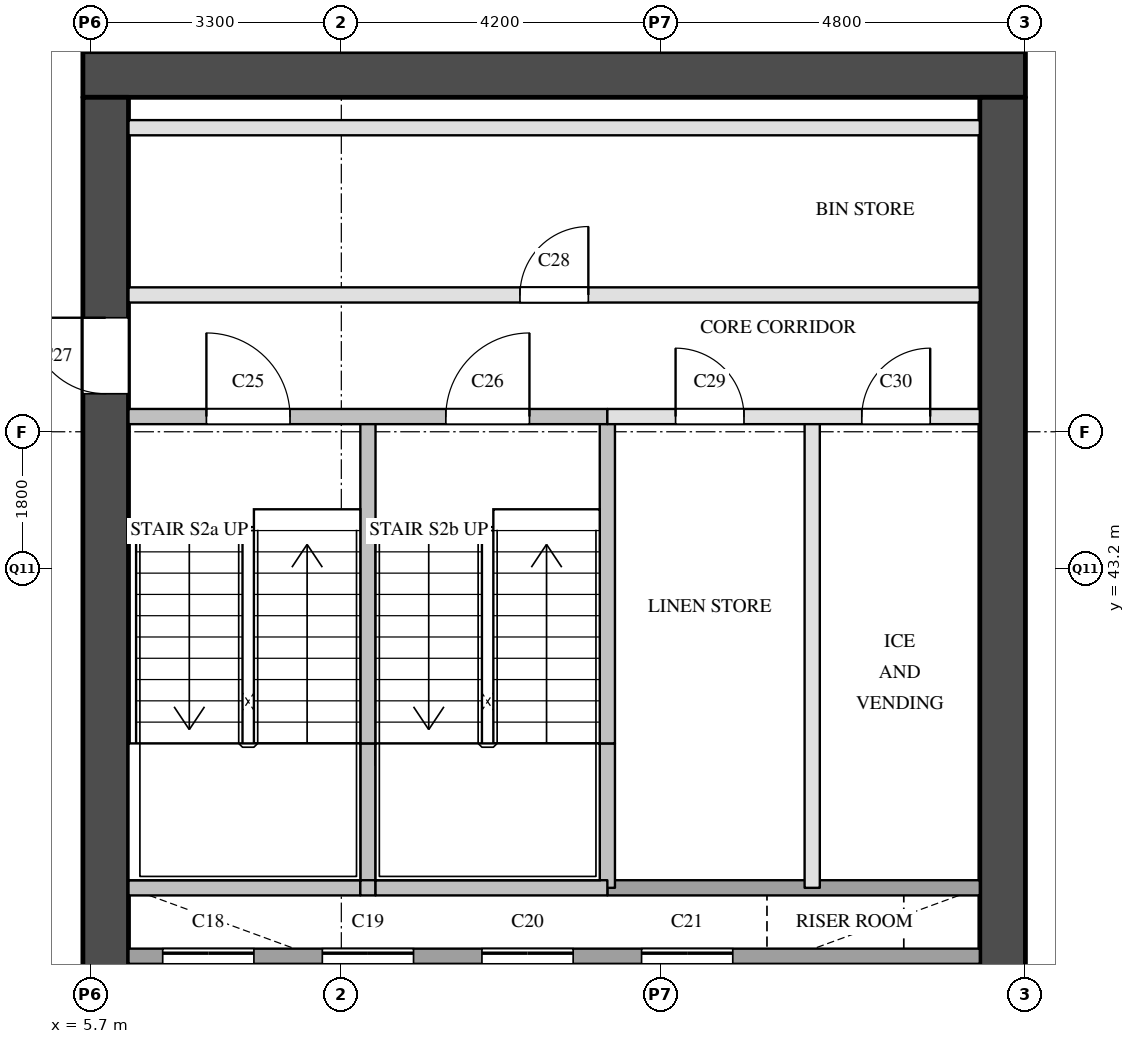
"""IFC4 building model, lengths in metres.
Left out: names, types, materials, properties, quantities, classifications, styles, units other than length and angle.
Written with IfcOpenShell. Run it as: python <this file> out.ifc"""

import sys

from ifc_helpers import new_model, si_unit, direction, frame, frame_2d, origin, place, context, subcontext, project, spatial, rectangle, extrude, element, fill, save


model = new_model("IFC4")
c1 = context("Model", 3, precision=1e-05, world=origin(), true_north=direction((0.0, 1.0)))
c2 = subcontext(c1, "Body", "Model", "MODEL_VIEW")
j1 = project(units=[si_unit("LENGTHUNIT", "METRE"), si_unit("PLANEANGLEUNIT", "RADIAN")], contexts=[c1])
p1 = place(None, origin())
s1 = spatial("IfcSite", under=j1, at=p1, CompositionType="ELEMENT")
p2 = place(p1, origin())
s2 = spatial("IfcBuilding", under=s1, at=p2, CompositionType="ELEMENT")
p3 = place(p2, frame((0.0, 0.0, 61.4)))
s3 = spatial("IfcBuildingStorey", under=s2, at=p3, CompositionType="ELEMENT", Elevation=61.4)
p4 = place(p3, frame((5.6, 49.7, 0.0), z_axis=(0.0, 0.0, 1.0), x_axis=(1.0, 0.0, 0.0)))
e1 = element("IfcWall", 1, at=p4, inside=s3, PredefinedType="SHEAR", context=c2, shape_type="SweptSolid", body=[
    extrude(rectangle(XDim=12.4, YDim=0.6, at=frame_2d((6.2, 0.0))), origin(), (0.0, 0.0, 1.0), 3.5),
])
p5 = place(p3, frame((5.9, 29.1, 0.0), z_axis=(0.0, 0.0, 1.0), x_axis=(0.0, 1.0, 0.0)))
e2 = element("IfcWall", 2, at=p5, inside=s3, PredefinedType="SHEAR", context=c2, shape_type="SweptSolid", body=[
    extrude(rectangle(XDim=20.3, YDim=0.6, at=frame_2d((10.15, 0.0))), origin(), (0.0, 0.0, 1.0), 3.5),
])
p6 = place(p5, frame((3.6, 0.0, 0.0)))
e3 = element("IfcOpeningElement", 3, at=p6, cuts=e2, PredefinedType="OPENING", context=c2, shape_type="SweptSolid", body=[
    extrude(rectangle(XDim=1.8, YDim=2.1, at=frame_2d((0.9, 1.05))), frame((0.0, 0.31, 0.0), z_axis=(0.0, -1.0, 0.0), x_axis=(1.0, 0.0, 0.0)), (0.0, 0.0, 1.0), 0.62),
])
p7 = place(p5, frame((16.4, 0.0, 0.0)))
e4 = element("IfcOpeningElement", 4, at=p7, cuts=e2, PredefinedType="OPENING", context=c2, shape_type="SweptSolid", body=[
    extrude(rectangle(XDim=1.0, YDim=2.1, at=frame_2d((0.5, 1.05))), frame((0.0, 0.31, 0.0), z_axis=(0.0, -1.0, 0.0), x_axis=(1.0, 0.0, 0.0)), (0.0, 0.0, 1.0), 0.62),
])
p8 = place(p3, frame((17.7, 29.1, 0.0), z_axis=(0.0, 0.0, 1.0), x_axis=(0.0, 1.0, 0.0)))
e5 = element("IfcWall", 5, at=p8, inside=s3, PredefinedType="SHEAR", context=c2, shape_type="SweptSolid", body=[
    extrude(rectangle(XDim=20.3, YDim=0.6, at=frame_2d((10.15, 0.0))), origin(), (0.0, 0.0, 1.0), 3.5),
])
p9 = place(p8, frame((1.25, 0.0, 0.0)))
e6 = element("IfcOpeningElement", 6, at=p9, cuts=e5, PredefinedType="OPENING", context=c2, shape_type="SweptSolid", body=[
    extrude(rectangle(XDim=0.7, YDim=2.1, at=frame_2d((0.35, 1.05))), frame((0.0, 0.31, 0.0), z_axis=(0.0, -1.0, 0.0), x_axis=(1.0, 0.0, 0.0)), (0.0, 0.0, 1.0), 0.62),
])
p10 = place(p8, frame((7.05, 0.0, 0.0)))
e7 = element("IfcOpeningElement", 7, at=p10, cuts=e5, PredefinedType="OPENING", context=c2, shape_type="SweptSolid", body=[
    extrude(rectangle(XDim=0.7, YDim=2.1, at=frame_2d((0.35, 1.05))), frame((0.0, 0.31, 0.0), z_axis=(0.0, -1.0, 0.0), x_axis=(1.0, 0.0, 0.0)), (0.0, 0.0, 1.0), 0.62),
])
p11 = place(p3, frame((8.3, 34.9, 0.0), z_axis=(0.0, 0.0, 1.0), x_axis=(0.0, 1.0, 0.0)))
e8 = element("IfcWall", 8, at=p11, inside=s3, PredefinedType="SOLIDWALL", context=c2, shape_type="SweptSolid", body=[
    extrude(rectangle(XDim=3.2, YDim=0.2, at=frame_2d((1.6, 0.0))), origin(), (0.0, 0.0, 1.0), 3.5),
])
p12 = place(p3, frame((9.35, 39.0, 0.0), z_axis=(0.0, 0.0, 1.0), x_axis=(0.0, 1.0, 0.0)))
e9 = element("IfcWall", 9, at=p12, inside=s3, PredefinedType="SOLIDWALL", context=c2, shape_type="SweptSolid", body=[
    extrude(rectangle(XDim=1.9, YDim=0.2, at=frame_2d((0.95, 0.0))), origin(), (0.0, 0.0, 1.0), 3.5),
])
p13 = place(p3, frame((9.35, 40.9, 0.0), z_axis=(0.0, 0.0, 1.0), x_axis=(0.0, 1.0, 0.0)))
e10 = element("IfcWall", 10, at=p13, inside=s3, PredefinedType="SOLIDWALL", context=c2, shape_type="SweptSolid", body=[
    extrude(rectangle(XDim=4.3, YDim=0.2, at=frame_2d((2.15, 0.0))), origin(), (0.0, 0.0, 1.0), 3.5),
])
for number, where, z_axis, x_axis in (
    (11, (10.4, 34.9, 0.0), (0.0, 0.0, 1.0), (0.0, 1.0, 0.0)),
    (12, (12.5, 34.9, 0.0), (0.0, 0.0, 1.0), (0.0, 1.0, 0.0)),
):
    element("IfcWall", number, at=place(p3, frame(where, z_axis=z_axis, x_axis=x_axis)), inside=s3, PredefinedType="SOLIDWALL", context=c2, shape_type="SweptSolid", body=[
        extrude(rectangle(XDim=3.2, YDim=0.2, at=frame_2d((1.6, 0.0))), origin(), (0.0, 0.0, 1.0), 3.5),
    ])
p14 = place(p3, frame((12.5, 39.0, 0.0), z_axis=(0.0, 0.0, 1.0), x_axis=(0.0, 1.0, 0.0)))
e13 = element("IfcWall", 13, at=p14, inside=s3, PredefinedType="SOLIDWALL", context=c2, shape_type="SweptSolid", body=[
    extrude(rectangle(XDim=1.9, YDim=0.2, at=frame_2d((0.95, 0.0))), origin(), (0.0, 0.0, 1.0), 3.5),
])
p15 = place(p3, frame((12.5, 40.9, 0.0), z_axis=(0.0, 0.0, 1.0), x_axis=(0.0, 1.0, 0.0)))
e14 = element("IfcWall", 14, at=p15, inside=s3, PredefinedType="SOLIDWALL", context=c2, shape_type="SweptSolid", body=[
    extrude(rectangle(XDim=4.3, YDim=0.2, at=frame_2d((2.15, 0.0))), origin(), (0.0, 0.0, 1.0), 3.5),
])
p16 = place(p3, frame((14.6, 34.9, 0.0), z_axis=(0.0, 0.0, 1.0), x_axis=(0.0, 1.0, 0.0)))
e15 = element("IfcWall", 15, at=p16, inside=s3, PredefinedType="SOLIDWALL", context=c2, shape_type="SweptSolid", body=[
    extrude(rectangle(XDim=3.2, YDim=0.2, at=frame_2d((1.6, 0.0))), origin(), (0.0, 0.0, 1.0), 3.5),
])
p17 = place(p3, frame((15.195, 39.0, 0.0), z_axis=(0.0, 0.0, 1.0), x_axis=(0.0, 1.0, 0.0)))
e16 = element("IfcWall", 16, at=p17, inside=s3, PredefinedType="PARTITIONING", context=c2, shape_type="SweptSolid", body=[
    extrude(rectangle(XDim=6.2, YDim=0.2, at=frame_2d((3.1, 0.0))), origin(), (0.0, 0.0, 1.0), 3.5),
])
p18 = place(p3, frame((16.7, 34.9, 0.0), z_axis=(0.0, 0.0, 1.0), x_axis=(0.0, 1.0, 0.0)))
e17 = element("IfcWall", 17, at=p18, inside=s3, PredefinedType="SOLIDWALL", context=c2, shape_type="SweptSolid", body=[
    extrude(rectangle(XDim=3.2, YDim=0.2, at=frame_2d((1.6, 0.0))), origin(), (0.0, 0.0, 1.0), 3.5),
])
p19 = place(p3, frame((6.2, 38.1, 0.0), z_axis=(0.0, 0.0, 1.0), x_axis=(1.0, 0.0, 0.0)))
e18 = element("IfcWall", 18, at=p19, inside=s3, PredefinedType="SOLIDWALL", context=c2, shape_type="SweptSolid", body=[
    extrude(rectangle(XDim=11.2, YDim=0.2, at=frame_2d((5.6, 0.0))), origin(), (0.0, 0.0, 1.0), 3.5),
])
p20 = place(p19, frame((0.45, 0.0, 0.0)))
e19 = element("IfcOpeningElement", 19, at=p20, cuts=e18, PredefinedType="OPENING", context=c2, shape_type="SweptSolid", body=[
    extrude(rectangle(XDim=1.2, YDim=2.1, at=frame_2d((0.6, 1.05))), frame((0.0, 0.11, 0.0), z_axis=(0.0, -1.0, 0.0), x_axis=(1.0, 0.0, 0.0)), (0.0, 0.0, 1.0), 0.22),
])
p21 = place(p19, frame((2.55, 0.0, 0.0)))
e20 = element("IfcOpeningElement", 20, at=p21, cuts=e18, PredefinedType="OPENING", context=c2, shape_type="SweptSolid", body=[
    extrude(rectangle(XDim=1.2, YDim=2.1, at=frame_2d((0.6, 1.05))), frame((0.0, 0.11, 0.0), z_axis=(0.0, -1.0, 0.0), x_axis=(1.0, 0.0, 0.0)), (0.0, 0.0, 1.0), 0.22),
])
p22 = place(p19, frame((4.65, 0.0, 0.0)))
e21 = element("IfcOpeningElement", 21, at=p22, cuts=e18, PredefinedType="OPENING", context=c2, shape_type="SweptSolid", body=[
    extrude(rectangle(XDim=1.2, YDim=2.1, at=frame_2d((0.6, 1.05))), frame((0.0, 0.11, 0.0), z_axis=(0.0, -1.0, 0.0), x_axis=(1.0, 0.0, 0.0)), (0.0, 0.0, 1.0), 0.22),
])
p23 = place(p19, frame((6.75, 0.0, 0.0)))
e22 = element("IfcOpeningElement", 22, at=p23, cuts=e18, PredefinedType="OPENING", context=c2, shape_type="SweptSolid", body=[
    extrude(rectangle(XDim=1.2, YDim=2.1, at=frame_2d((0.6, 1.05))), frame((0.0, 0.11, 0.0), z_axis=(0.0, -1.0, 0.0), x_axis=(1.0, 0.0, 0.0)), (0.0, 0.0, 1.0), 0.22),
])
p24 = place(p3, frame((12.5, 39.0, 0.0), z_axis=(0.0, 0.0, 1.0), x_axis=(1.0, 0.0, 0.0)))
e23 = element("IfcWall", 23, at=p24, inside=s3, PredefinedType="SOLIDWALL", context=c2, shape_type="SweptSolid", body=[
    extrude(rectangle(XDim=4.9, YDim=0.2, at=frame_2d((2.45, 0.0))), origin(), (0.0, 0.0, 1.0), 3.5),
])
p25 = place(p3, frame((6.2, 39.0, 0.0), z_axis=(0.0, 0.0, 1.0), x_axis=(1.0, 0.0, 0.0)))
e24 = element("IfcWall", 24, at=p25, inside=s3, PredefinedType="SOLIDWALL", context=c2, shape_type="SweptSolid", body=[
    extrude(rectangle(XDim=3.05, YDim=0.2, at=frame_2d((1.525, 0.0))), origin(), (0.0, 0.0, 1.0), 3.5),
])
p26 = place(p3, frame((9.25, 39.0, 0.0), z_axis=(0.0, 0.0, 1.0), x_axis=(1.0, 0.0, 0.0)))
e25 = element("IfcWall", 25, at=p26, inside=s3, PredefinedType="SOLIDWALL", context=c2, shape_type="SweptSolid", body=[
    extrude(rectangle(XDim=0.2, YDim=0.2, at=frame_2d((0.1, 0.0))), origin(), (0.0, 0.0, 1.0), 3.5),
])
p27 = place(p3, frame((9.45, 39.0, 0.0), z_axis=(0.0, 0.0, 1.0), x_axis=(1.0, 0.0, 0.0)))
e26 = element("IfcWall", 26, at=p27, inside=s3, PredefinedType="SOLIDWALL", context=c2, shape_type="SweptSolid", body=[
    extrude(rectangle(XDim=3.05, YDim=0.2, at=frame_2d((1.525, 0.0))), origin(), (0.0, 0.0, 1.0), 3.5),
])
p28 = place(p3, frame((12.5, 45.2, 0.0), z_axis=(0.0, 0.0, 1.0), x_axis=(1.0, 0.0, 0.0)))
e27 = element("IfcWall", 27, at=p28, inside=s3, PredefinedType="PARTITIONING", context=c2, shape_type="SweptSolid", body=[
    extrude(rectangle(XDim=4.9, YDim=0.2, at=frame_2d((2.45, 0.0))), origin(), (0.0, 0.0, 1.0), 3.5),
])
p29 = place(p28, frame((0.897, 0.0, 0.0)))
e28 = element("IfcOpeningElement", 28, at=p29, cuts=e27, PredefinedType="OPENING", context=c2, shape_type="SweptSolid", body=[
    extrude(rectangle(XDim=0.9, YDim=2.1, at=frame_2d((0.45, 1.05))), frame((0.0, 0.11, 0.0), z_axis=(0.0, -1.0, 0.0), x_axis=(1.0, 0.0, 0.0)), (0.0, 0.0, 1.0), 0.22),
])
p30 = place(p28, frame((3.347, 0.0, 0.0)))
e29 = element("IfcOpeningElement", 29, at=p30, cuts=e27, PredefinedType="OPENING", context=c2, shape_type="SweptSolid", body=[
    extrude(rectangle(XDim=0.9, YDim=2.1, at=frame_2d((0.45, 1.05))), frame((0.0, 0.11, 0.0), z_axis=(0.0, -1.0, 0.0), x_axis=(1.0, 0.0, 0.0)), (0.0, 0.0, 1.0), 0.22),
])
p31 = place(p3, frame((6.2, 45.2, 0.0), z_axis=(0.0, 0.0, 1.0), x_axis=(1.0, 0.0, 0.0)))
e30 = element("IfcWall", 30, at=p31, inside=s3, PredefinedType="SOLIDWALL", context=c2, shape_type="SweptSolid", body=[
    extrude(rectangle(XDim=6.3, YDim=0.2, at=frame_2d((3.15, 0.0))), origin(), (0.0, 0.0, 1.0), 3.5),
])
p32 = place(p31, frame((1.025, 0.0, 0.0)))
e31 = element("IfcOpeningElement", 31, at=p32, cuts=e30, PredefinedType="OPENING", context=c2, shape_type="SweptSolid", body=[
    extrude(rectangle(XDim=1.1, YDim=2.1, at=frame_2d((0.55, 1.05))), frame((0.0, 0.11, 0.0), z_axis=(0.0, -1.0, 0.0), x_axis=(1.0, 0.0, 0.0)), (0.0, 0.0, 1.0), 0.22),
])
p33 = place(p31, frame((4.175, 0.0, 0.0)))
e32 = element("IfcOpeningElement", 32, at=p33, cuts=e30, PredefinedType="OPENING", context=c2, shape_type="SweptSolid", body=[
    extrude(rectangle(XDim=1.1, YDim=2.1, at=frame_2d((0.55, 1.05))), frame((0.0, 0.11, 0.0), z_axis=(0.0, -1.0, 0.0), x_axis=(1.0, 0.0, 0.0)), (0.0, 0.0, 1.0), 0.22),
])
p34 = place(p3, frame((6.2, 46.8, 0.0), z_axis=(0.0, 0.0, 1.0), x_axis=(1.0, 0.0, 0.0)))
e33 = element("IfcWall", 33, at=p34, inside=s3, PredefinedType="PARTITIONING", context=c2, shape_type="SweptSolid", body=[
    extrude(rectangle(XDim=11.2, YDim=0.2, at=frame_2d((5.6, 0.0))), origin(), (0.0, 0.0, 1.0), 3.5),
])
p35 = place(p34, frame((5.15, 0.0, 0.0)))
e34 = element("IfcOpeningElement", 34, at=p35, cuts=e33, PredefinedType="OPENING", context=c2, shape_type="SweptSolid", body=[
    extrude(rectangle(XDim=0.9, YDim=2.1, at=frame_2d((0.45, 1.05))), frame((0.0, 0.11, 0.0), z_axis=(0.0, -1.0, 0.0), x_axis=(1.0, 0.0, 0.0)), (0.0, 0.0, 1.0), 0.22),
])
p36 = place(p3, frame((6.2, 49.0, 0.0), z_axis=(0.0, 0.0, 1.0), x_axis=(1.0, 0.0, 0.0)))
e35 = element("IfcWall", 35, at=p36, inside=s3, PredefinedType="PARTITIONING", context=c2, shape_type="SweptSolid", body=[
    extrude(rectangle(XDim=11.2, YDim=0.2, at=frame_2d((5.6, 0.0))), origin(), (0.0, 0.0, 1.0), 3.5),
])
p37 = place(p20, origin())
e36 = element("IfcDoor", 36, at=p37, inside=s3, OperationType="SLIDING_TO_LEFT", PredefinedType="DOOR", context=c2, shape_type="SweptSolid", body=[
    extrude(rectangle(XDim=1.2, YDim=2.1, at=frame_2d((0.6, 1.05))), frame((0.0, 0.025, 0.0), z_axis=(0.0, -1.0, 0.0), x_axis=(1.0, 0.0, 0.0)), (0.0, 0.0, 1.0), 0.05),
])
fill(e19, e36)
p38 = place(p21, origin())
e37 = element("IfcDoor", 37, at=p38, inside=s3, OperationType="SLIDING_TO_LEFT", PredefinedType="DOOR", context=c2, shape_type="SweptSolid", body=[
    extrude(rectangle(XDim=1.2, YDim=2.1, at=frame_2d((0.6, 1.05))), frame((0.0, 0.025, 0.0), z_axis=(0.0, -1.0, 0.0), x_axis=(1.0, 0.0, 0.0)), (0.0, 0.0, 1.0), 0.05),
])
fill(e20, e37)
p39 = place(p22, origin())
e38 = element("IfcDoor", 38, at=p39, inside=s3, OperationType="SLIDING_TO_LEFT", PredefinedType="DOOR", context=c2, shape_type="SweptSolid", body=[
    extrude(rectangle(XDim=1.2, YDim=2.1, at=frame_2d((0.6, 1.05))), frame((0.0, 0.025, 0.0), z_axis=(0.0, -1.0, 0.0), x_axis=(1.0, 0.0, 0.0)), (0.0, 0.0, 1.0), 0.05),
])
fill(e21, e38)
p40 = place(p23, origin())
e39 = element("IfcDoor", 39, at=p40, inside=s3, OperationType="SLIDING_TO_LEFT", PredefinedType="DOOR", context=c2, shape_type="SweptSolid", body=[
    extrude(rectangle(XDim=1.2, YDim=2.1, at=frame_2d((0.6, 1.05))), frame((0.0, 0.025, 0.0), z_axis=(0.0, -1.0, 0.0), x_axis=(1.0, 0.0, 0.0)), (0.0, 0.0, 1.0), 0.05),
])
fill(e22, e39)
p41 = place(p32, origin())
e40 = element("IfcDoor", 40, at=p41, inside=s3, OperationType="SINGLE_SWING_LEFT", PredefinedType="DOOR", context=c2, shape_type="SweptSolid", body=[
    extrude(rectangle(XDim=1.1, YDim=2.1, at=frame_2d((0.55, 1.05))), frame((0.0, 0.025, 0.0), z_axis=(0.0, -1.0, 0.0), x_axis=(1.0, 0.0, 0.0)), (0.0, 0.0, 1.0), 0.05),
])
fill(e31, e40)
p42 = place(p33, origin())
e41 = element("IfcDoor", 41, at=p42, inside=s3, OperationType="SINGLE_SWING_RIGHT", PredefinedType="DOOR", context=c2, shape_type="SweptSolid", body=[
    extrude(rectangle(XDim=1.1, YDim=2.1, at=frame_2d((0.55, 1.05))), frame((0.0, 0.025, 0.0), z_axis=(0.0, -1.0, 0.0), x_axis=(1.0, 0.0, 0.0)), (0.0, 0.0, 1.0), 0.05),
])
fill(e32, e41)
p43 = place(p7, origin())
e42 = element("IfcDoor", 42, at=p43, inside=s3, OperationType="SINGLE_SWING_RIGHT", PredefinedType="DOOR", context=c2, shape_type="SweptSolid", body=[
    extrude(rectangle(XDim=1.0, YDim=2.1, at=frame_2d((0.5, 1.05))), frame((0.0, 0.025, 0.0), z_axis=(0.0, -1.0, 0.0), x_axis=(1.0, 0.0, 0.0)), (0.0, 0.0, 1.0), 0.05),
])
fill(e4, e42)
p44 = place(p35, origin())
e43 = element("IfcDoor", 43, at=p44, inside=s3, OperationType="SINGLE_SWING_RIGHT", PredefinedType="DOOR", context=c2, shape_type="SweptSolid", body=[
    extrude(rectangle(XDim=0.9, YDim=2.1, at=frame_2d((0.45, 1.05))), frame((0.0, 0.025, 0.0), z_axis=(0.0, -1.0, 0.0), x_axis=(1.0, 0.0, 0.0)), (0.0, 0.0, 1.0), 0.05),
])
fill(e34, e43)
p45 = place(p29, origin())
e44 = element("IfcDoor", 44, at=p45, inside=s3, OperationType="SINGLE_SWING_LEFT", PredefinedType="DOOR", context=c2, shape_type="SweptSolid", body=[
    extrude(rectangle(XDim=0.9, YDim=2.1, at=frame_2d((0.45, 1.05))), frame((0.0, 0.025, 0.0), z_axis=(0.0, -1.0, 0.0), x_axis=(1.0, 0.0, 0.0)), (0.0, 0.0, 1.0), 0.05),
])
fill(e28, e44)
p46 = place(p30, origin())
e45 = element("IfcDoor", 45, at=p46, inside=s3, OperationType="SINGLE_SWING_RIGHT", PredefinedType="DOOR", context=c2, shape_type="SweptSolid", body=[
    extrude(rectangle(XDim=0.9, YDim=2.1, at=frame_2d((0.45, 1.05))), frame((0.0, 0.025, 0.0), z_axis=(0.0, -1.0, 0.0), x_axis=(1.0, 0.0, 0.0)), (0.0, 0.0, 1.0), 0.05),
])
fill(e29, e45)
save(model, sys.argv[1])
